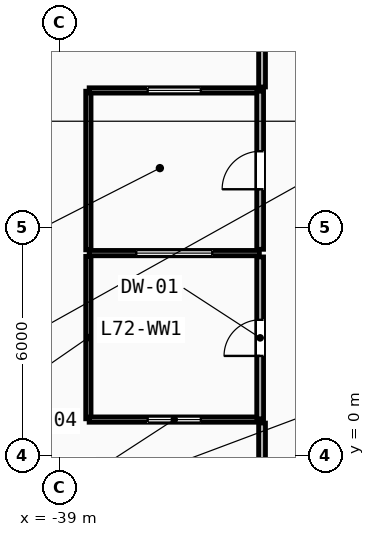
"""IFC4 building model, lengths in metres.
Left out: names, types, materials, properties, quantities, classifications, styles, units other than length and angle.
Written with IfcOpenShell. Run it as: python <this file> out.ifc"""

import sys

from ifc_helpers import new_model, si_unit, direction, frame, frame_2d, origin, place, context, subcontext, project, spatial, rectangle, extrude, element, fill, save


model = new_model("IFC4")
c1 = context("Model", 3, precision=1e-05, world=origin(), true_north=direction((0.0, 1.0)))
c2 = subcontext(c1, "Body", "Model", "MODEL_VIEW")
j1 = project(units=[si_unit("LENGTHUNIT", "METRE"), si_unit("PLANEANGLEUNIT", "RADIAN")], contexts=[c1])
p1 = place(None, origin())
s1 = spatial("IfcSite", under=j1, at=p1, CompositionType="ELEMENT")
p2 = place(p1, origin())
s2 = spatial("IfcBuilding", under=s1, at=p2, CompositionType="ELEMENT")
p3 = place(p2, frame((0.0, 0.0, 272.0)))
s3 = spatial("IfcBuildingStorey", under=s2, at=p3, CompositionType="ELEMENT", Elevation=272.0)
p4 = place(p3, frame((-38.24, 0.97, 0.0), z_axis=(0.0, 0.0, 1.0), x_axis=(0.0, 1.0, 0.0)))
e1 = element("IfcWall", 1, at=p4, inside=s3, PredefinedType="PARTITIONING", context=c2, shape_type="SweptSolid", body=[
    extrude(rectangle(XDim=4.275, YDim=0.14, at=frame_2d((2.138, 0.0))), origin(), (0.0, 0.0, 1.0), 3.34),
])
p5 = place(p3, frame((-38.24, 5.415, 0.0), z_axis=(0.0, 0.0, 1.0), x_axis=(0.0, 1.0, 0.0)))
e2 = element("IfcWall", 2, at=p5, inside=s3, PredefinedType="PARTITIONING", context=c2, shape_type="SweptSolid", body=[
    extrude(rectangle(XDim=4.175, YDim=0.14, at=frame_2d((2.087, 0.0))), origin(), (0.0, 0.0, 1.0), 3.34),
])
p6 = place(p3, frame((-38.22, 0.95, 0.0), z_axis=(0.0, 0.0, 1.0), x_axis=(1.0, 0.0, 0.0)))
e3 = element("IfcWall", 3, at=p6, inside=s3, PredefinedType="PARTITIONING", context=c2, shape_type="SweptSolid", body=[
    extrude(rectangle(XDim=4.48, YDim=0.14, at=frame_2d((2.24, 0.0))), origin(), (0.0, 0.0, 1.0), 3.34),
])
p7 = place(p6, frame((1.54, 0.0, 1.05)))
e4 = element("IfcOpeningElement", 4, at=p7, cuts=e3, PredefinedType="OPENING", context=c2, shape_type="SweptSolid", body=[
    extrude(rectangle(XDim=1.4, YDim=1.5, at=frame_2d((0.7, 0.75))), frame((0.0, 0.08, 0.0), z_axis=(0.0, -1.0, 0.0), x_axis=(1.0, 0.0, 0.0)), (0.0, 0.0, 1.0), 0.16),
])
p8 = place(p3, frame((-38.22, 5.33, 0.0), z_axis=(0.0, 0.0, 1.0), x_axis=(1.0, 0.0, 0.0)))
e5 = element("IfcWall", 5, at=p8, inside=s3, PredefinedType="PARTITIONING", context=c2, shape_type="SweptSolid", body=[
    extrude(rectangle(XDim=4.48, YDim=0.14, at=frame_2d((2.24, 0.0))), origin(), (0.0, 0.0, 1.0), 3.34),
])
p9 = place(p8, frame((1.24, 0.0, 1.05)))
e6 = element("IfcOpeningElement", 6, at=p9, cuts=e5, PredefinedType="OPENING", context=c2, shape_type="SweptSolid", body=[
    extrude(rectangle(XDim=2.0, YDim=1.5, at=frame_2d((1.0, 0.75))), frame((0.0, 0.08, 0.0), z_axis=(0.0, -1.0, 0.0), x_axis=(1.0, 0.0, 0.0)), (0.0, 0.0, 1.0), 0.16),
])
p10 = place(p3, frame((-38.22, 9.61, 0.0), z_axis=(0.0, 0.0, 1.0), x_axis=(1.0, 0.0, 0.0)))
e7 = element("IfcWall", 7, at=p10, inside=s3, PredefinedType="PARTITIONING", context=c2, shape_type="SweptSolid", body=[
    extrude(rectangle(XDim=4.48, YDim=0.14, at=frame_2d((2.24, 0.0))), origin(), (0.0, 0.0, 1.0), 3.34),
])
p11 = place(p10, frame((1.54, 0.0, 1.05)))
e8 = element("IfcOpeningElement", 8, at=p11, cuts=e7, PredefinedType="OPENING", context=c2, shape_type="SweptSolid", body=[
    extrude(rectangle(XDim=1.4, YDim=1.5, at=frame_2d((0.7, 0.75))), frame((0.0, 0.08, 0.0), z_axis=(0.0, -1.0, 0.0), x_axis=(1.0, 0.0, 0.0)), (0.0, 0.0, 1.0), 0.16),
])
p12 = place(p3, frame((-33.72, 0.97, 0.0), z_axis=(0.0, 0.0, 1.0), x_axis=(0.0, 1.0, 0.0)))
e9 = element("IfcWall", 9, at=p12, inside=s3, PredefinedType="PARTITIONING", context=c2, shape_type="SweptSolid", body=[
    extrude(rectangle(XDim=4.26, YDim=0.18, at=frame_2d((2.13, 0.0))), origin(), (0.0, 0.0, 1.0), 3.34),
])
p13 = place(p12, frame((1.655, 0.0, 0.0)))
e10 = element("IfcOpeningElement", 10, at=p13, cuts=e9, PredefinedType="OPENING", context=c2, shape_type="SweptSolid", body=[
    extrude(rectangle(XDim=0.95, YDim=2.1, at=frame_2d((0.475, 1.05))), frame((0.0, 0.1, 0.0), z_axis=(0.0, -1.0, 0.0), x_axis=(1.0, 0.0, 0.0)), (0.0, 0.0, 1.0), 0.2),
])
p14 = place(p3, frame((-33.72, 5.43, 0.0), z_axis=(0.0, 0.0, 1.0), x_axis=(0.0, 1.0, 0.0)))
e11 = element("IfcWall", 11, at=p14, inside=s3, PredefinedType="PARTITIONING", context=c2, shape_type="SweptSolid", body=[
    extrude(rectangle(XDim=4.16, YDim=0.18, at=frame_2d((2.08, 0.0))), origin(), (0.0, 0.0, 1.0), 3.34),
])
p15 = place(p14, frame((1.58, 0.0, 0.0)))
e12 = element("IfcOpeningElement", 12, at=p15, cuts=e11, PredefinedType="OPENING", context=c2, shape_type="SweptSolid", body=[
    extrude(rectangle(XDim=1.0, YDim=2.15, at=frame_2d((0.5, 1.075))), frame((0.0, 0.1, 0.0), z_axis=(0.0, -1.0, 0.0), x_axis=(1.0, 0.0, 0.0)), (0.0, 0.0, 1.0), 0.2),
])
p16 = place(p3, frame((-33.67, 17.428, 0.0), z_axis=(0.0, 0.0, 1.0), x_axis=(0.0, -1.0, 0.0)))
e13 = element("IfcWall", 13, at=p16, inside=s3, PredefinedType="PARTITIONING", context=c2, shape_type="SweptSolid", body=[
    extrude(rectangle(XDim=7.727, YDim=0.18, at=frame_2d((3.864, 0.0))), origin(), (0.0, 0.0, 1.0), 3.34),
])
p17 = place(p16, frame((3.164, 0.0, 1.05)))
e14 = element("IfcOpeningElement", 14, at=p17, cuts=e13, PredefinedType="OPENING", context=c2, shape_type="SweptSolid", body=[
    extrude(rectangle(XDim=1.4, YDim=1.5, at=frame_2d((0.7, 0.75))), frame((0.0, 0.1, 0.0), z_axis=(0.0, -1.0, 0.0), x_axis=(1.0, 0.0, 0.0)), (0.0, 0.0, 1.0), 0.2),
])
p18 = place(p3, frame((-33.67, 0.859, 0.0), z_axis=(0.0, 0.0, 1.0), x_axis=(0.0, -1.0, 0.0)))
e15 = element("IfcWall", 15, at=p18, inside=s3, PredefinedType="PARTITIONING", context=c2, shape_type="SweptSolid", body=[
    extrude(rectangle(XDim=1.187, YDim=0.18, at=frame_2d((0.594, 0.0))), origin(), (0.0, 0.0, 1.0), 3.34),
])
p19 = place(p13, origin())
e16 = element("IfcDoor", 16, at=p19, inside=s3, OperationType="SINGLE_SWING_LEFT", PredefinedType="DOOR", context=c2, shape_type="SweptSolid", body=[
    extrude(rectangle(XDim=0.95, YDim=2.1, at=frame_2d((0.475, 1.05))), frame((0.0, 0.025, 0.0), z_axis=(0.0, -1.0, 0.0), x_axis=(1.0, 0.0, 0.0)), (0.0, 0.0, 1.0), 0.05),
])
fill(e10, e16)
p20 = place(p15, origin())
e17 = element("IfcDoor", 17, at=p20, inside=s3, OperationType="SINGLE_SWING_LEFT", PredefinedType="DOOR", context=c2, shape_type="SweptSolid", body=[
    extrude(rectangle(XDim=1.0, YDim=2.15, at=frame_2d((0.5, 1.075))), frame((0.0, 0.025, 0.0), z_axis=(0.0, -1.0, 0.0), x_axis=(1.0, 0.0, 0.0)), (0.0, 0.0, 1.0), 0.05),
])
fill(e12, e17)
p21 = place(p7, origin())
e18 = element("IfcWindow", 18, at=p21, inside=s3, PartitioningType="SINGLE_PANEL", PredefinedType="WINDOW", context=c2, shape_type="SweptSolid", body=[
    extrude(rectangle(XDim=1.4, YDim=1.5, at=frame_2d((0.7, 0.75))), frame((0.0, 0.03, 0.0), z_axis=(0.0, -1.0, 0.0), x_axis=(1.0, 0.0, 0.0)), (0.0, 0.0, 1.0), 0.06),
])
fill(e4, e18)
p22 = place(p9, origin())
e19 = element("IfcWindow", 19, at=p22, inside=s3, PartitioningType="SINGLE_PANEL", PredefinedType="WINDOW", context=c2, shape_type="SweptSolid", body=[
    extrude(rectangle(XDim=2.0, YDim=1.5, at=frame_2d((1.0, 0.75))), frame((0.0, 0.03, 0.0), z_axis=(0.0, -1.0, 0.0), x_axis=(1.0, 0.0, 0.0)), (0.0, 0.0, 1.0), 0.06),
])
fill(e6, e19)
p23 = place(p11, origin())
e20 = element("IfcWindow", 20, at=p23, inside=s3, PartitioningType="SINGLE_PANEL", PredefinedType="WINDOW", context=c2, shape_type="SweptSolid", body=[
    extrude(rectangle(XDim=1.4, YDim=1.5, at=frame_2d((0.7, 0.75))), frame((0.0, 0.03, 0.0), z_axis=(0.0, -1.0, 0.0), x_axis=(1.0, 0.0, 0.0)), (0.0, 0.0, 1.0), 0.06),
])
fill(e8, e20)
save(model, sys.argv[1])
